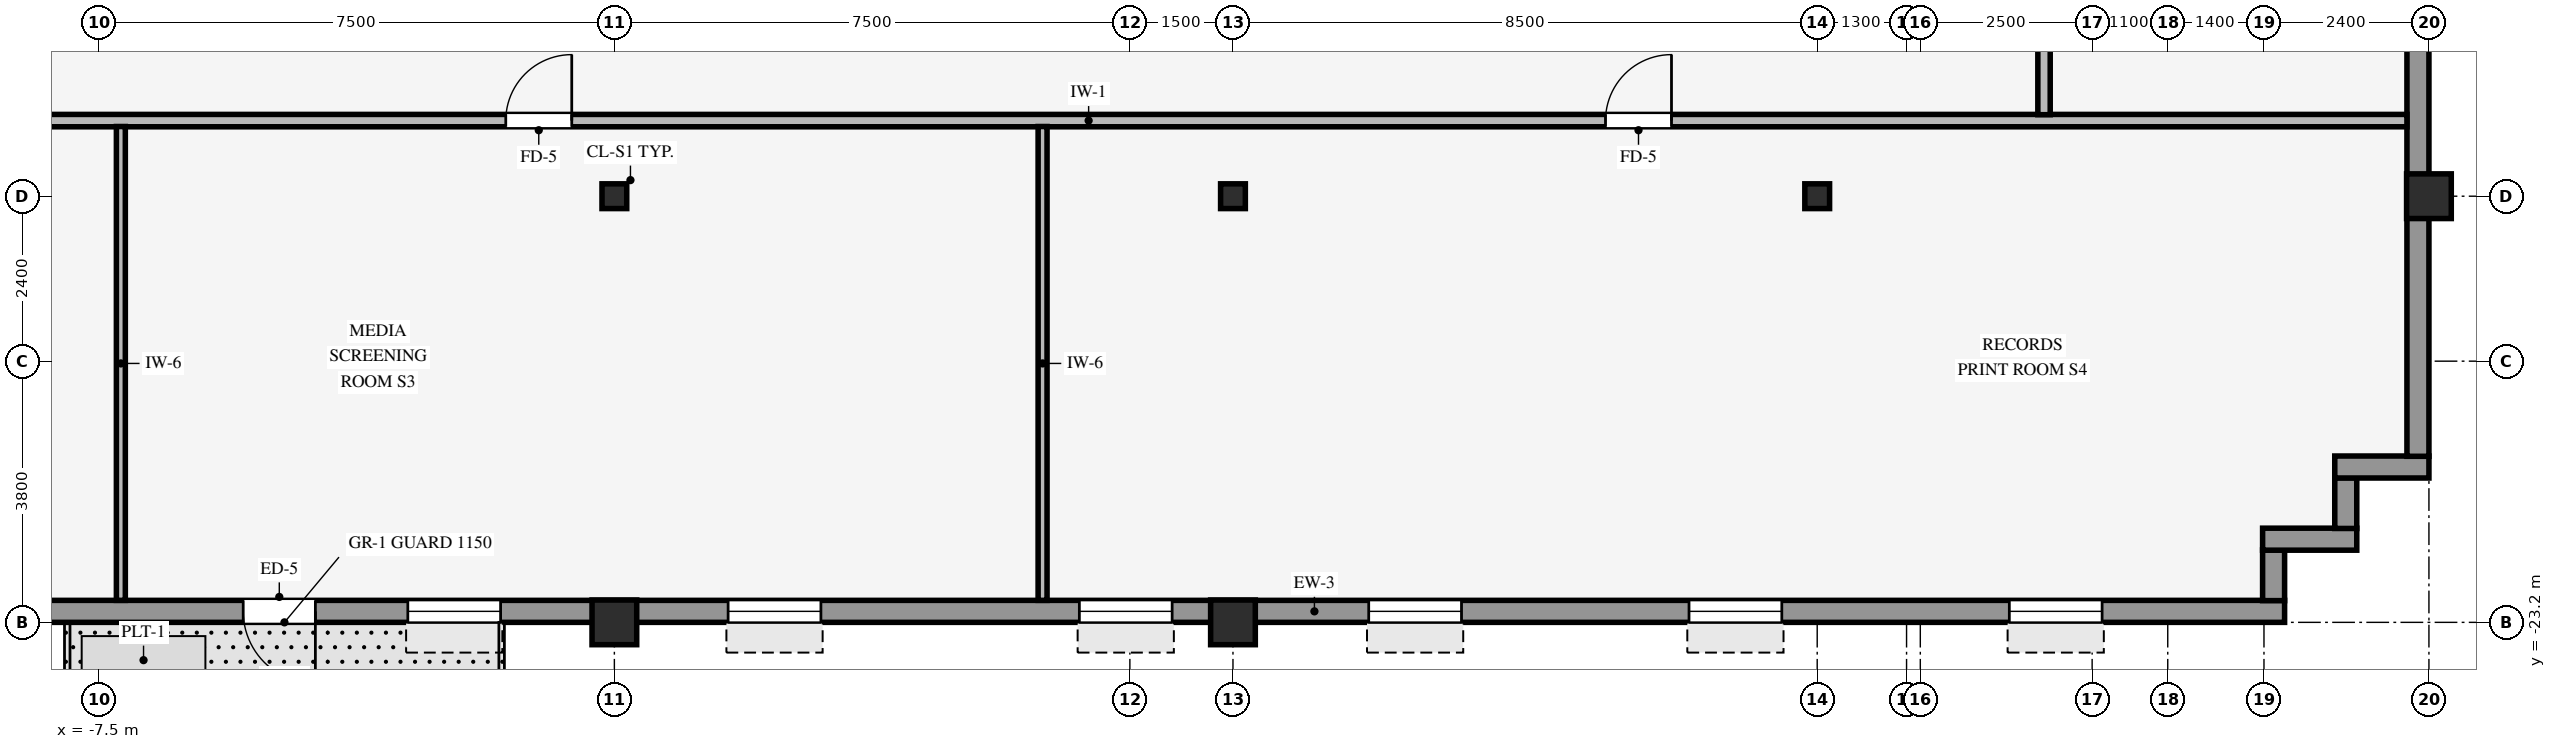
"""IFC4 building model, lengths in metres.
Left out: names, types, materials, properties, quantities, classifications, styles, units other than length and angle.
Written with IfcOpenShell. Run it as: python <this file> out.ifc"""

import sys

from ifc_helpers import new_model, si_unit, direction, frame, frame_2d, origin, origin_2d, place, context, subcontext, project, spatial, rectangle, hollow_rectangle, i_section, extrude, source, transform, mapped, element, fill, save


model = new_model("IFC4")
c1 = context("Model", 3, precision=1e-05, world=origin(), true_north=direction((0.0, 1.0)))
c2 = subcontext(c1, "Body", "Model", "MODEL_VIEW")
j1 = project(units=[si_unit("LENGTHUNIT", "METRE"), si_unit("PLANEANGLEUNIT", "RADIAN")], contexts=[c1])
p1 = place(None, origin())
s1 = spatial("IfcSite", under=j1, at=p1, CompositionType="ELEMENT")
p2 = place(p1, origin())
s2 = spatial("IfcBuilding", under=s1, at=p2, CompositionType="ELEMENT")
p3 = place(p2, frame((0.0, 0.0, 156.7)))
s3 = spatial("IfcBuildingStorey", under=s2, at=p3, CompositionType="ELEMENT", Elevation=156.7)
for number, where, z_axis, x_axis in (
    (1, (26.4, -17.0, 0.0), (0.0, 0.0, 1.0), (1.0, 0.0, 0.0)),
    (2, (0.0, -23.2, 0.0), (0.0, 0.0, 1.0), (1.0, 0.0, 0.0)),
    (3, (9.0, -23.2, 0.0), (0.0, 0.0, 1.0), (1.0, 0.0, 0.0)),
):
    element("IfcColumn", number, at=place(p3, frame(where, z_axis=z_axis, x_axis=x_axis)), inside=s3, PredefinedType="COLUMN", context=c2, shape_type="SweptSolid", body=[
        extrude(hollow_rectangle(XDim=0.65, YDim=0.65, WallThickness=0.04, InnerFilletRadius=0.04, OuterFilletRadius=0.08, at=origin_2d()), origin(), (0.0, 0.0, 1.0), 3.37),
    ])
for number, where, z_axis, x_axis in (
    (4, (0.0, -17.0, 0.0), (0.0, 0.0, 1.0), (1.0, 0.0, 0.0)),
    (5, (9.0, -17.0, 0.0), (0.0, 0.0, 1.0), (1.0, 0.0, 0.0)),
    (6, (17.5, -17.0, 0.0), (0.0, 0.0, 1.0), (1.0, 0.0, 0.0)),
):
    element("IfcColumn", number, at=place(p3, frame(where, z_axis=z_axis, x_axis=x_axis)), inside=s3, PredefinedType="COLUMN", context=c2, shape_type="SweptSolid", body=[
        extrude(i_section(OverallWidth=0.36, OverallDepth=0.36, WebThickness=0.021, FlangeThickness=0.021, FilletRadius=0.018, at=origin_2d()), origin(), (0.0, 0.0, 1.0), 3.37),
    ])
p4 = place(p3, frame((-24.3, -23.04, 0.0), z_axis=(0.0, 0.0, 1.0), x_axis=(1.0, 0.0, 0.0)))
e7 = element("IfcWall", 7, at=p4, inside=s3, PredefinedType="STANDARD", context=c2, shape_type="SweptSolid", body=[
    extrude(rectangle(XDim=48.6, YDim=0.32, at=frame_2d((24.3, 0.0))), origin(), (0.0, 0.0, 1.0), 2.705),
])
p5 = place(p4, frame((19.95, 0.0, 0.0), z_axis=(0.0, 0.0, 1.0), x_axis=(-1.0, 0.0, 0.0)))
e8 = element("IfcOpeningElement", 8, at=p5, cuts=e7, PredefinedType="OPENING", context=c2, shape_type="SweptSolid", body=[
    extrude(rectangle(XDim=1.05, YDim=2.1, at=frame_2d((0.525, 1.05))), frame((0.0, 0.17, 0.0), z_axis=(0.0, -1.0, 0.0), x_axis=(1.0, 0.0, 0.0)), (0.0, 0.0, 1.0), 0.34),
])
p6 = place(p4, frame((2.655, 0.0, 0.8)))
e9 = element("IfcOpeningElement", 9, at=p6, cuts=e7, PredefinedType="OPENING", context=c2, shape_type="SweptSolid", body=[
    extrude(rectangle(XDim=1.35, YDim=1.56, at=frame_2d((0.675, 0.78))), frame((0.0, 0.17, 0.0), z_axis=(0.0, -1.0, 0.0), x_axis=(1.0, 0.0, 0.0)), (0.0, 0.0, 1.0), 0.34),
])
p7 = place(p4, frame((7.315, 0.0, 0.8)))
e10 = element("IfcOpeningElement", 10, at=p7, cuts=e7, PredefinedType="OPENING", context=c2, shape_type="SweptSolid", body=[
    extrude(rectangle(XDim=1.35, YDim=1.56, at=frame_2d((0.675, 0.78))), frame((0.0, 0.17, 0.0), z_axis=(0.0, -1.0, 0.0), x_axis=(1.0, 0.0, 0.0)), (0.0, 0.0, 1.0), 0.34),
])
p8 = place(p4, frame((11.975, 0.0, 0.8)))
e11 = element("IfcOpeningElement", 11, at=p8, cuts=e7, PredefinedType="OPENING", context=c2, shape_type="SweptSolid", body=[
    extrude(rectangle(XDim=1.35, YDim=1.56, at=frame_2d((0.675, 0.78))), frame((0.0, 0.17, 0.0), z_axis=(0.0, -1.0, 0.0), x_axis=(1.0, 0.0, 0.0)), (0.0, 0.0, 1.0), 0.34),
])
p9 = place(p4, frame((21.295, 0.0, 0.8)))
e12 = element("IfcOpeningElement", 12, at=p9, cuts=e7, PredefinedType="OPENING", context=c2, shape_type="SweptSolid", body=[
    extrude(rectangle(XDim=1.35, YDim=1.56, at=frame_2d((0.675, 0.78))), frame((0.0, 0.17, 0.0), z_axis=(0.0, -1.0, 0.0), x_axis=(1.0, 0.0, 0.0)), (0.0, 0.0, 1.0), 0.34),
])
p10 = place(p4, frame((25.955, 0.0, 0.8)))
e13 = element("IfcOpeningElement", 13, at=p10, cuts=e7, PredefinedType="OPENING", context=c2, shape_type="SweptSolid", body=[
    extrude(rectangle(XDim=1.35, YDim=1.56, at=frame_2d((0.675, 0.78))), frame((0.0, 0.17, 0.0), z_axis=(0.0, -1.0, 0.0), x_axis=(1.0, 0.0, 0.0)), (0.0, 0.0, 1.0), 0.34),
])
p11 = place(p4, frame((31.065, 0.0, 0.8)))
e14 = element("IfcOpeningElement", 14, at=p11, cuts=e7, PredefinedType="OPENING", context=c2, shape_type="SweptSolid", body=[
    extrude(rectangle(XDim=1.35, YDim=1.56, at=frame_2d((0.675, 0.78))), frame((0.0, 0.17, 0.0), z_axis=(0.0, -1.0, 0.0), x_axis=(1.0, 0.0, 0.0)), (0.0, 0.0, 1.0), 0.34),
])
p12 = place(p4, frame((35.275, 0.0, 0.8)))
e15 = element("IfcOpeningElement", 15, at=p12, cuts=e7, PredefinedType="OPENING", context=c2, shape_type="SweptSolid", body=[
    extrude(rectangle(XDim=1.35, YDim=1.56, at=frame_2d((0.675, 0.78))), frame((0.0, 0.17, 0.0), z_axis=(0.0, -1.0, 0.0), x_axis=(1.0, 0.0, 0.0)), (0.0, 0.0, 1.0), 0.34),
])
p13 = place(p4, frame((39.935, 0.0, 0.8)))
e16 = element("IfcOpeningElement", 16, at=p13, cuts=e7, PredefinedType="OPENING", context=c2, shape_type="SweptSolid", body=[
    extrude(rectangle(XDim=1.35, YDim=1.56, at=frame_2d((0.675, 0.78))), frame((0.0, 0.17, 0.0), z_axis=(0.0, -1.0, 0.0), x_axis=(1.0, 0.0, 0.0)), (0.0, 0.0, 1.0), 0.34),
])
p14 = place(p4, frame((44.595, 0.0, 0.8)))
e17 = element("IfcOpeningElement", 17, at=p14, cuts=e7, PredefinedType="OPENING", context=c2, shape_type="SweptSolid", body=[
    extrude(rectangle(XDim=1.35, YDim=1.56, at=frame_2d((0.675, 0.78))), frame((0.0, 0.17, 0.0), z_axis=(0.0, -1.0, 0.0), x_axis=(1.0, 0.0, 0.0)), (0.0, 0.0, 1.0), 0.34),
])
p15 = place(p3, frame((24.14, -22.884, 0.0), z_axis=(0.0, 0.0, 1.0), x_axis=(0.0, 1.0, 0.0)))
e18 = element("IfcWall", 18, at=p15, inside=s3, PredefinedType="STANDARD", context=c2, shape_type="SweptSolid", body=[
    extrude(rectangle(XDim=0.738, YDim=0.32, at=frame_2d((0.369, 0.0))), origin(), (0.0, 0.0, 1.0), 3.36),
])
p16 = place(p3, frame((23.98, -21.99, 0.0), z_axis=(0.0, 0.0, 1.0), x_axis=(1.0, 0.0, 0.0)))
e19 = element("IfcWall", 19, at=p16, inside=s3, PredefinedType="STANDARD", context=c2, shape_type="SweptSolid", body=[
    extrude(rectangle(XDim=1.37, YDim=0.32, at=frame_2d((0.685, 0.0))), origin(), (0.0, 0.0, 1.0), 3.36),
])
p17 = place(p3, frame((25.19, -21.834, 0.0), z_axis=(0.0, 0.0, 1.0), x_axis=(0.0, 1.0, 0.0)))
e20 = element("IfcWall", 20, at=p17, inside=s3, PredefinedType="STANDARD", context=c2, shape_type="SweptSolid", body=[
    extrude(rectangle(XDim=0.738, YDim=0.32, at=frame_2d((0.369, 0.0))), origin(), (0.0, 0.0, 1.0), 3.36),
])
p18 = place(p3, frame((25.03, -20.94, 0.0), z_axis=(0.0, 0.0, 1.0), x_axis=(1.0, 0.0, 0.0)))
e21 = element("IfcWall", 21, at=p18, inside=s3, PredefinedType="STANDARD", context=c2, shape_type="SweptSolid", body=[
    extrude(rectangle(XDim=1.37, YDim=0.32, at=frame_2d((0.685, 0.0))), origin(), (0.0, 0.0, 1.0), 3.36),
])
p19 = place(p3, frame((26.24, -20.784, 0.0), z_axis=(0.0, 0.0, 1.0), x_axis=(0.0, 1.0, 0.0)))
e22 = element("IfcWall", 22, at=p19, inside=s3, PredefinedType="STANDARD", context=c2, shape_type="SweptSolid", body=[
    extrude(rectangle(XDim=41.568, YDim=0.32, at=frame_2d((20.784, 0.0))), origin(), (0.0, 0.0, 1.0), 2.705),
])
p20 = place(p19, frame((7.369, 0.0, 0.8)))
e23 = element("IfcOpeningElement", 23, at=p20, cuts=e22, PredefinedType="OPENING", context=c2, shape_type="SweptSolid", body=[
    extrude(rectangle(XDim=2.1, YDim=1.56, at=frame_2d((1.05, 0.78))), frame((0.0, 0.17, 0.0), z_axis=(0.0, -1.0, 0.0), x_axis=(1.0, 0.0, 0.0)), (0.0, 0.0, 1.0), 0.34),
])
p21 = place(p19, frame((12.315, 0.0, 0.8)))
e24 = element("IfcOpeningElement", 24, at=p21, cuts=e22, PredefinedType="OPENING", context=c2, shape_type="SweptSolid", body=[
    extrude(rectangle(XDim=2.1, YDim=1.56, at=frame_2d((1.05, 0.78))), frame((0.0, 0.17, 0.0), z_axis=(0.0, -1.0, 0.0), x_axis=(1.0, 0.0, 0.0)), (0.0, 0.0, 1.0), 0.34),
])
p22 = place(p19, frame((17.261, 0.0, 0.8)))
e25 = element("IfcOpeningElement", 25, at=p22, cuts=e22, PredefinedType="OPENING", context=c2, shape_type="SweptSolid", body=[
    extrude(rectangle(XDim=2.1, YDim=1.56, at=frame_2d((1.05, 0.78))), frame((0.0, 0.17, 0.0), z_axis=(0.0, -1.0, 0.0), x_axis=(1.0, 0.0, 0.0)), (0.0, 0.0, 1.0), 0.34),
])
p23 = place(p19, frame((22.207, 0.0, 0.8)))
e26 = element("IfcOpeningElement", 26, at=p23, cuts=e22, PredefinedType="OPENING", context=c2, shape_type="SweptSolid", body=[
    extrude(rectangle(XDim=2.1, YDim=1.56, at=frame_2d((1.05, 0.78))), frame((0.0, 0.17, 0.0), z_axis=(0.0, -1.0, 0.0), x_axis=(1.0, 0.0, 0.0)), (0.0, 0.0, 1.0), 0.34),
])
p24 = place(p19, frame((27.153, 0.0, 0.8)))
e27 = element("IfcOpeningElement", 27, at=p24, cuts=e22, PredefinedType="OPENING", context=c2, shape_type="SweptSolid", body=[
    extrude(rectangle(XDim=2.1, YDim=1.56, at=frame_2d((1.05, 0.78))), frame((0.0, 0.17, 0.0), z_axis=(0.0, -1.0, 0.0), x_axis=(1.0, 0.0, 0.0)), (0.0, 0.0, 1.0), 0.34),
])
p25 = place(p19, frame((32.099, 0.0, 0.8)))
e28 = element("IfcOpeningElement", 28, at=p25, cuts=e22, PredefinedType="OPENING", context=c2, shape_type="SweptSolid", body=[
    extrude(rectangle(XDim=2.1, YDim=1.56, at=frame_2d((1.05, 0.78))), frame((0.0, 0.17, 0.0), z_axis=(0.0, -1.0, 0.0), x_axis=(1.0, 0.0, 0.0)), (0.0, 0.0, 1.0), 0.34),
])
p26 = place(p3, frame((-26.08, -15.9, 0.0), z_axis=(0.0, 0.0, 1.0), x_axis=(1.0, 0.0, 0.0)))
e29 = element("IfcWall", 29, at=p26, inside=s3, PredefinedType="PARTITIONING", context=c2, shape_type="SweptSolid", body=[
    extrude(rectangle(XDim=52.16, YDim=0.18, at=frame_2d((26.08, 0.0))), origin(), (0.0, 0.0, 1.0), 3.36),
])
p27 = place(p26, frame((24.5, 0.0, 0.0)))
e30 = element("IfcOpeningElement", 30, at=p27, cuts=e29, PredefinedType="OPENING", context=c2, shape_type="SweptSolid", body=[
    extrude(rectangle(XDim=0.96, YDim=2.1, at=frame_2d((0.48, 1.05))), frame((0.0, 0.1, 0.0), z_axis=(0.0, -1.0, 0.0), x_axis=(1.0, 0.0, 0.0)), (0.0, 0.0, 1.0), 0.2),
])
p28 = place(p26, frame((40.5, 0.0, 0.0)))
e31 = element("IfcOpeningElement", 31, at=p28, cuts=e29, PredefinedType="OPENING", context=c2, shape_type="SweptSolid", body=[
    extrude(rectangle(XDim=0.96, YDim=2.1, at=frame_2d((0.48, 1.05))), frame((0.0, 0.1, 0.0), z_axis=(0.0, -1.0, 0.0), x_axis=(1.0, 0.0, 0.0)), (0.0, 0.0, 1.0), 0.2),
])
p29 = place(p26, frame((13.16, 0.0, 0.0)))
e32 = element("IfcOpeningElement", 32, at=p29, cuts=e29, PredefinedType="OPENING", context=c2, shape_type="SweptSolid", body=[
    extrude(rectangle(XDim=0.96, YDim=2.1, at=frame_2d((0.48, 1.05))), frame((0.0, 0.1, 0.0), z_axis=(0.0, -1.0, 0.0), x_axis=(1.0, 0.0, 0.0)), (0.0, 0.0, 1.0), 0.2),
])
p30 = place(p26, frame((6.425, 0.0, 0.0)))
e33 = element("IfcOpeningElement", 33, at=p30, cuts=e29, PredefinedType="OPENING", context=c2, shape_type="SweptSolid", body=[
    extrude(rectangle(XDim=0.96, YDim=2.1, at=frame_2d((0.48, 1.05))), frame((0.0, 0.1, 0.0), z_axis=(0.0, -1.0, 0.0), x_axis=(1.0, 0.0, 0.0)), (0.0, 0.0, 1.0), 0.2),
])
for number, where, z_axis, x_axis in (
    (34, (-7.18, -22.88, 0.0), (0.0, 0.0, 1.0), (0.0, 1.0, 0.0)),
    (35, (6.23, -22.88, 0.0), (0.0, 0.0, 1.0), (0.0, 1.0, 0.0)),
):
    element("IfcWall", number, at=place(p3, frame(where, z_axis=z_axis, x_axis=x_axis)), inside=s3, PredefinedType="PARTITIONING", context=c2, shape_type="SweptSolid", body=[
        extrude(rectangle(XDim=6.894, YDim=0.13, at=frame_2d((3.447, 0.0))), origin(), (0.0, 0.0, 1.0), 3.36),
    ])
p31 = place(p3, frame((20.8, -15.814, 0.0), z_axis=(0.0, 0.0, 1.0), x_axis=(0.0, 1.0, 0.0)))
e36 = element("IfcWall", 36, at=p31, inside=s3, PredefinedType="PARTITIONING", context=c2, shape_type="SweptSolid", body=[
    extrude(rectangle(XDim=2.228, YDim=0.18, at=frame_2d((1.114, 0.0))), origin(), (0.0, 0.0, 1.0), 3.36),
])
m1 = source(origin(), c2, "Body", "SweptSolid", [
    extrude(rectangle(XDim=1.05, YDim=2.1, at=frame_2d((0.525, 1.05))), frame((0.0, 0.025, 0.0), z_axis=(0.0, -1.0, 0.0), x_axis=(1.0, 0.0, 0.0)), (0.0, 0.0, 1.0), 0.05),
])
p32 = place(p5, origin())
e37 = element("IfcDoor", 37, at=p32, inside=s3, OperationType="SINGLE_SWING_LEFT", PredefinedType="DOOR", context=c2, shape_type="MappedRepresentation", body=[
    mapped(m1, transform((0.0, 0.0, 0.0), scale=1.0)),
])
fill(e8, e37)
m2 = source(origin(), c2, "Body", "SweptSolid", [
    extrude(rectangle(XDim=1.35, YDim=1.56, at=frame_2d((0.675, 0.78))), frame((0.0, 0.03, 0.0), z_axis=(0.0, -1.0, 0.0), x_axis=(1.0, 0.0, 0.0)), (0.0, 0.0, 1.0), 0.06),
])
p33 = place(p9, origin())
e38 = element("IfcWindow", 38, at=p33, inside=s3, PartitioningType="SINGLE_PANEL", PredefinedType="WINDOW", context=c2, shape_type="MappedRepresentation", body=[
    mapped(m2, transform((0.0, 0.0, 0.0), scale=1.0)),
])
fill(e12, e38)
p34 = place(p10, origin())
e39 = element("IfcWindow", 39, at=p34, inside=s3, PartitioningType="SINGLE_PANEL", PredefinedType="WINDOW", context=c2, shape_type="MappedRepresentation", body=[
    mapped(m2, transform((0.0, 0.0, 0.0), scale=1.0)),
])
fill(e13, e39)
p35 = place(p11, origin())
e40 = element("IfcWindow", 40, at=p35, inside=s3, PartitioningType="SINGLE_PANEL", PredefinedType="WINDOW", context=c2, shape_type="MappedRepresentation", body=[
    mapped(m2, transform((0.0, 0.0, 0.0), scale=1.0)),
])
fill(e14, e40)
p36 = place(p12, origin())
e41 = element("IfcWindow", 41, at=p36, inside=s3, PartitioningType="SINGLE_PANEL", PredefinedType="WINDOW", context=c2, shape_type="MappedRepresentation", body=[
    mapped(m2, transform((0.0, 0.0, 0.0), scale=1.0)),
])
fill(e15, e41)
p37 = place(p13, origin())
e42 = element("IfcWindow", 42, at=p37, inside=s3, PartitioningType="SINGLE_PANEL", PredefinedType="WINDOW", context=c2, shape_type="MappedRepresentation", body=[
    mapped(m2, transform((0.0, 0.0, 0.0), scale=1.0)),
])
fill(e16, e42)
p38 = place(p14, origin())
e43 = element("IfcWindow", 43, at=p38, inside=s3, PartitioningType="SINGLE_PANEL", PredefinedType="WINDOW", context=c2, shape_type="MappedRepresentation", body=[
    mapped(m2, transform((0.0, 0.0, 0.0), scale=1.0)),
])
fill(e17, e43)
m3 = source(origin(), c2, "Body", "SweptSolid", [
    extrude(rectangle(XDim=0.96, YDim=2.1, at=frame_2d((0.48, 1.05))), frame((0.0, 0.025, 0.0), z_axis=(0.0, -1.0, 0.0), x_axis=(1.0, 0.0, 0.0)), (0.0, 0.0, 1.0), 0.05),
])
p39 = place(p27, origin())
e44 = element("IfcDoor", 44, at=p39, inside=s3, OperationType="SINGLE_SWING_RIGHT", PredefinedType="DOOR", context=c2, shape_type="MappedRepresentation", body=[
    mapped(m3, transform((0.0, 0.0, 0.0), scale=1.0)),
])
fill(e30, e44)
p40 = place(p28, origin())
e45 = element("IfcDoor", 45, at=p40, inside=s3, OperationType="SINGLE_SWING_RIGHT", PredefinedType="DOOR", context=c2, shape_type="MappedRepresentation", body=[
    mapped(m3, transform((0.0, 0.0, 0.0), scale=1.0)),
])
fill(e31, e45)
save(model, sys.argv[1])
